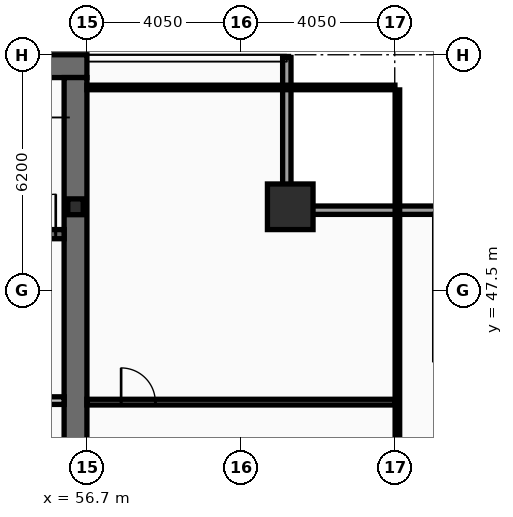
"""IFC4 building model, lengths in metres.
Left out: names, types, materials, properties, quantities, classifications, styles, units other than length and angle.
Written with IfcOpenShell. Run it as: python <this file> out.ifc"""

import sys

from ifc_helpers import new_model, si_unit, direction, frame, frame_2d, origin, origin_2d, place, context, subcontext, project, spatial, rectangle, hollow_rectangle, i_section, extrude, element, fill, save


model = new_model("IFC4")
c1 = context("Model", 3, precision=1e-05, world=origin(), true_north=direction((0.0, 1.0)))
c2 = subcontext(c1, "Body", "Model", "MODEL_VIEW")
j1 = project(units=[si_unit("LENGTHUNIT", "METRE"), si_unit("PLANEANGLEUNIT", "RADIAN")], contexts=[c1])
p1 = place(None, origin())
s1 = spatial("IfcSite", under=j1, at=p1, CompositionType="ELEMENT")
p2 = place(p1, origin())
s2 = spatial("IfcBuilding", under=s1, at=p2, CompositionType="ELEMENT")
p3 = place(p2, frame((0.0, 0.0, 231.8)))
s3 = spatial("IfcBuildingStorey", under=s2, at=p3, CompositionType="ELEMENT", Elevation=231.8)
p4 = place(p3, frame((16.2, 53.4, 0.0), z_axis=(0.0, 0.0, 1.0), x_axis=(1.0, 0.0, 0.0)))
e1 = element("IfcWall", 1, at=p4, inside=s3, PredefinedType="SHEAR", context=c2, shape_type="SweptSolid", body=[
    extrude(rectangle(XDim=40.5, YDim=0.6, at=frame_2d((20.25, 0.0))), origin(), (0.0, 0.0, 1.0), 3.44),
])
p5 = place(p3, frame((56.4, 53.1, 0.0), z_axis=(0.0, 0.0, 1.0), x_axis=(0.0, -1.0, 0.0)))
e2 = element("IfcWall", 2, at=p5, inside=s3, PredefinedType="SHEAR", context=c2, shape_type="SweptSolid", body=[
    extrude(rectangle(XDim=11.2, YDim=0.6, at=frame_2d((5.6, 0.0))), origin(), (0.0, 0.0, 1.0), 3.44),
])
p6 = place(p3, frame((48.63, 48.98, 0.0), z_axis=(0.0, 0.0, 1.0), x_axis=(1.0, 0.0, 0.0)))
e3 = element("IfcWall", 3, at=p6, inside=s3, PredefinedType="SHEAR", context=c2, shape_type="SweptSolid", body=[
    extrude(rectangle(XDim=7.47, YDim=0.24, at=frame_2d((3.735, 0.0))), origin(), (0.0, 0.0, 1.0), 3.44),
])
p7 = place(p6, frame((6.2, 0.0, 0.0)))
e4 = element("IfcOpeningElement", 4, at=p7, cuts=e3, PredefinedType="OPENING", context=c2, shape_type="SweptSolid", body=[
    extrude(rectangle(XDim=1.05, YDim=2.15, at=frame_2d((0.525, 1.075))), frame((0.0, 0.13, 0.0), z_axis=(0.0, -1.0, 0.0), x_axis=(1.0, 0.0, 0.0)), (0.0, 0.0, 1.0), 0.26),
])
p8 = place(p3, frame((62.05, 49.7, 0.0), z_axis=(0.0, 0.0, 1.0), x_axis=(1.0, 0.0, 0.0)))
e5 = element("IfcColumn", 5, at=p8, inside=s3, PredefinedType="COLUMN", context=c2, shape_type="SweptSolid", body=[
    extrude(hollow_rectangle(XDim=1.2, YDim=1.2, WallThickness=0.06, at=origin_2d()), origin(), (0.0, 0.0, 1.0), 3.6),
])
p9 = place(p3, frame((56.4, 49.7, 0.0), z_axis=(0.0, 0.0, 1.0), x_axis=(1.0, 0.0, 0.0)))
e6 = element("IfcColumn", 6, at=p9, inside=s3, PredefinedType="COLUMN", context=c2, shape_type="SweptSolid", body=[
    extrude(i_section(OverallWidth=0.406, OverallDepth=0.416, WebThickness=0.03, FlangeThickness=0.048, at=origin_2d()), origin(), (0.0, 0.0, 1.0), 3.6),
])
p10 = place(p3, frame((61.96, 53.63, 0.0), z_axis=(0.0, 0.0, 1.0), x_axis=(0.0, -1.0, 0.0)))
e7 = element("IfcWall", 7, at=p10, inside=s3, PredefinedType="SOLIDWALL", context=c2, shape_type="SweptSolid", body=[
    extrude(rectangle(XDim=3.91, YDim=0.22, at=frame_2d((1.955, 0.0))), origin(), (0.0, 0.0, 1.0), 2.83),
])
p11 = place(p3, frame((61.85, 49.61, 0.0), z_axis=(0.0, 0.0, 1.0), x_axis=(1.0, 0.0, 0.0)))
e8 = element("IfcWall", 8, at=p11, inside=s3, PredefinedType="SOLIDWALL", context=c2, shape_type="SweptSolid", body=[
    extrude(rectangle(XDim=4.22, YDim=0.22, at=frame_2d((2.11, 0.0))), origin(), (0.0, 0.0, 1.0), 2.83),
])
p12 = place(p3, frame((51.9, 44.6, 0.0), z_axis=(0.0, 0.0, 1.0), x_axis=(1.0, 0.0, 0.0)))
e9 = element("IfcWall", 9, at=p12, inside=s3, PredefinedType="PARTITIONING", context=c2, shape_type="SweptSolid", body=[
    extrude(rectangle(XDim=4.2, YDim=0.2, at=frame_2d((2.1, 0.0))), origin(), (0.0, 0.0, 1.0), 3.44),
])
p13 = place(p12, frame((1.15, 0.0, 0.0)))
e10 = element("IfcOpeningElement", 10, at=p13, cuts=e9, PredefinedType="OPENING", context=c2, shape_type="SweptSolid", body=[
    extrude(rectangle(XDim=1.05, YDim=2.15, at=frame_2d((0.525, 1.075))), frame((0.0, 0.11, 0.0), z_axis=(0.0, -1.0, 0.0), x_axis=(1.0, 0.0, 0.0)), (0.0, 0.0, 1.0), 0.22),
])
p14 = place(p3, frame((56.7, 44.56, 0.0), z_axis=(0.0, 0.0, 1.0), x_axis=(1.0, 0.0, 0.0)))
e11 = element("IfcWall", 11, at=p14, inside=s3, PredefinedType="PARTITIONING", context=c2, shape_type="SweptSolid", body=[
    extrude(rectangle(XDim=8.105, YDim=0.15, at=frame_2d((4.052, 0.0))), origin(), (0.0, 0.0, 1.0), 2.83),
])
p15 = place(p14, frame((0.9, 0.0, 0.0)))
e12 = element("IfcOpeningElement", 12, at=p15, cuts=e11, PredefinedType="OPENING", context=c2, shape_type="SweptSolid", body=[
    extrude(rectangle(XDim=0.9, YDim=2.05, at=frame_2d((0.45, 1.025))), frame((0.0, 0.085, 0.0), z_axis=(0.0, -1.0, 0.0), x_axis=(1.0, 0.0, 0.0)), (0.0, 0.0, 1.0), 0.17),
])
p16 = place(p3, frame((64.87, 10.665, 0.0), z_axis=(0.0, 0.0, 1.0), x_axis=(0.0, 1.0, 0.0)))
e13 = element("IfcWall", 13, at=p16, inside=s3, PredefinedType="PARTITIONING", context=c2, shape_type="SweptSolid", body=[
    extrude(rectangle(XDim=42.11, YDim=0.12, at=frame_2d((21.055, 0.0))), origin(), (0.0, 0.0, 1.0), 2.78),
])
p17 = place(p3, frame((56.7, 52.84, 0.0), z_axis=(0.0, 0.0, 1.0), x_axis=(1.0, 0.0, 0.0)))
e14 = element("IfcWall", 14, at=p17, inside=s3, PredefinedType="PARTITIONING", context=c2, shape_type="SweptSolid", body=[
    extrude(rectangle(XDim=8.105, YDim=0.12, at=frame_2d((4.052, 0.0))), origin(), (0.0, 0.0, 1.0), 3.44),
])
p18 = place(p7, origin())
e15 = element("IfcDoor", 15, at=p18, inside=s3, OperationType="SINGLE_SWING_RIGHT", PredefinedType="DOOR", context=c2, shape_type="SweptSolid", body=[
    extrude(rectangle(XDim=1.05, YDim=2.15, at=frame_2d((0.525, 1.075))), frame((0.0, 0.025, 0.0), z_axis=(0.0, -1.0, 0.0), x_axis=(1.0, 0.0, 0.0)), (0.0, 0.0, 1.0), 0.05),
])
fill(e4, e15)
p19 = place(p15, origin())
e16 = element("IfcDoor", 16, at=p19, inside=s3, OperationType="SINGLE_SWING_LEFT", PredefinedType="DOOR", context=c2, shape_type="SweptSolid", body=[
    extrude(rectangle(XDim=0.9, YDim=2.05, at=frame_2d((0.45, 1.025))), frame((0.0, 0.025, 0.0), z_axis=(0.0, -1.0, 0.0), x_axis=(1.0, 0.0, 0.0)), (0.0, 0.0, 1.0), 0.05),
])
fill(e12, e16)
save(model, sys.argv[1])
